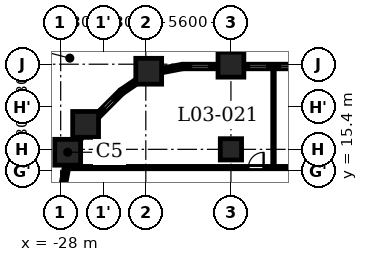
"""IFC4 building model, lengths in metres.
Left out: names, types, materials, properties, quantities, classifications, styles, units other than length and angle.
Written with IfcOpenShell. Run it as: python <this file> out.ifc"""

import sys

from ifc_helpers import new_model, si_unit, direction, frame, frame_2d, origin, origin_2d, place, context, subcontext, project, spatial, rectangle, extrude, element, fill, save


model = new_model("IFC4")
c1 = context("Model", 3, precision=1e-05, world=origin(), true_north=direction((0.0, 1.0)))
c2 = subcontext(c1, "Body", "Model", "MODEL_VIEW")
j1 = project(units=[si_unit("LENGTHUNIT", "METRE"), si_unit("PLANEANGLEUNIT", "RADIAN")], contexts=[c1])
p1 = place(None, origin())
s1 = spatial("IfcSite", under=j1, at=p1, CompositionType="ELEMENT")
p2 = place(p1, origin())
s2 = spatial("IfcBuilding", under=s1, at=p2, CompositionType="ELEMENT")
p3 = place(p2, frame((0.0, 0.0, 16.1)))
s3 = spatial("IfcBuildingStorey", under=s2, at=p3, CompositionType="ELEMENT", Elevation=16.1)
for number, where, z_axis, x_axis in (
    (1, (-16.8, 22.4, 0.0), (0.0, 0.0, 1.0), (1.0, 0.0, 0.0)),
    (2, (-22.209, 21.938, 0.0), (0.0, 0.0, 1.0), (1.0, 0.0, 0.0)),
    (3, (-26.36, 18.44, 0.0), (0.0, 0.0, 1.0), (1.0, 0.0, 0.0)),
    (4, (-27.538, 16.609, 0.0), (0.0, 0.0, 1.0), (1.0, 0.0, 0.0)),
):
    element("IfcColumn", number, at=place(p3, frame(where, z_axis=z_axis, x_axis=x_axis)), inside=s3, PredefinedType="COLUMN", context=c2, shape_type="SweptSolid", body=[
        extrude(rectangle(XDim=1.7, YDim=1.7, at=origin_2d()), origin(), (0.0, 0.0, 1.0), 4.8),
    ])
p4 = place(p3, frame((-16.8, 16.8, 0.0), z_axis=(0.0, 0.0, 1.0), x_axis=(1.0, 0.0, 0.0)))
e5 = element("IfcColumn", 5, at=p4, inside=s3, PredefinedType="COLUMN", context=c2, shape_type="SweptSolid", body=[
    extrude(rectangle(XDim=1.4, YDim=1.4, at=origin_2d()), origin(), (0.0, 0.0, 1.0), 4.8),
])
p5 = place(p3, frame((-12.05, 22.25, 0.0), z_axis=(0.0, 0.0, 1.0), x_axis=(-1.0, 0.0, 0.0)))
e6 = element("IfcWall", 6, at=p5, inside=s3, PredefinedType="SOLIDWALL", context=c2, shape_type="SweptSolid", body=[
    extrude(rectangle(XDim=3.9, YDim=0.3, at=frame_2d((1.95, 0.0))), origin(), (0.0, 0.0, 1.0), 3.55),
])
p6 = place(p5, frame((0.337, 0.0, 0.6)))
e7 = element("IfcOpeningElement", 7, at=p6, cuts=e6, PredefinedType="OPENING", context=c2, shape_type="SweptSolid", body=[
    extrude(rectangle(XDim=1.2, YDim=1.55, at=frame_2d((0.6, 0.775))), frame((0.0, 0.16, 0.0), z_axis=(0.0, -1.0, 0.0), x_axis=(1.0, 0.0, 0.0)), (0.0, 0.0, 1.0), 0.32),
])
p7 = place(p5, frame((2.363, 0.0, 0.6)))
e8 = element("IfcOpeningElement", 8, at=p7, cuts=e6, PredefinedType="OPENING", context=c2, shape_type="SweptSolid", body=[
    extrude(rectangle(XDim=1.2, YDim=1.55, at=frame_2d((0.6, 0.775))), frame((0.0, 0.16, 0.0), z_axis=(0.0, -1.0, 0.0), x_axis=(1.0, 0.0, 0.0)), (0.0, 0.0, 1.0), 0.32),
])
p8 = place(p3, frame((-17.65, 22.25, 0.0), z_axis=(0.0, 0.0, 1.0), x_axis=(-1.0, 0.0, 0.0)))
e9 = element("IfcWall", 9, at=p8, inside=s3, PredefinedType="SOLIDWALL", context=c2, shape_type="SweptSolid", body=[
    extrude(rectangle(XDim=2.35, YDim=0.3, at=frame_2d((1.175, 0.0))), origin(), (0.0, 0.0, 1.0), 3.55),
])
p9 = place(p8, frame((0.575, 0.0, 0.6)))
e10 = element("IfcOpeningElement", 10, at=p9, cuts=e9, PredefinedType="OPENING", context=c2, shape_type="SweptSolid", body=[
    extrude(rectangle(XDim=1.2, YDim=1.55, at=frame_2d((0.6, 0.775))), frame((0.0, 0.16, 0.0), z_axis=(0.0, -1.0, 0.0), x_axis=(1.0, 0.0, 0.0)), (0.0, 0.0, 1.0), 0.32),
])
for number, where, z_axis, x_axis in (
    (11, (-19.972, 22.253, 0.0), (0.0, 0.0, 1.0), (-0.982, -0.187, 0.0)),
    (12, (-22.85, 21.369, 0.0), (0.0, 0.0, 1.0), (-0.827, -0.562, 0.0)),
):
    element("IfcWall", number, at=place(p3, frame(where, z_axis=z_axis, x_axis=x_axis)), inside=s3, PredefinedType="SOLIDWALL", context=c2, shape_type="SweptSolid", body=[
        extrude(rectangle(XDim=1.406, YDim=0.3, at=frame_2d((0.703, 0.0))), origin(), (0.0, 0.0, 1.0), 3.55),
    ])
p10 = place(p3, frame((-23.991, 20.597, 0.0), z_axis=(0.0, 0.0, 1.0), x_axis=(-0.707054835785, -0.707158722772, 0.0)))
e13 = element("IfcWall", 13, at=p10, inside=s3, PredefinedType="SOLIDWALL", context=c2, shape_type="SweptSolid", body=[
    extrude(rectangle(XDim=2.35, YDim=0.3, at=frame_2d((1.175, 0.0))), origin(), (0.0, 0.0, 1.0), 3.55),
])
p11 = place(p10, frame((0.775, 0.0, 0.6)))
e14 = element("IfcOpeningElement", 14, at=p11, cuts=e13, PredefinedType="OPENING", context=c2, shape_type="SweptSolid", body=[
    extrude(rectangle(XDim=0.8, YDim=1.55, at=frame_2d((0.4, 0.775))), frame((0.0, 0.16, 0.0), z_axis=(0.0, -1.0, 0.0), x_axis=(1.0, 0.0, 0.0)), (0.0, 0.0, 1.0), 0.32),
])
p12 = place(p3, frame((-26.701, 17.644, 0.0), z_axis=(0.0, 0.0, 1.0), x_axis=(-0.562001981492, -0.827135885329, 0.0)))
e15 = element("IfcWall", 15, at=p12, inside=s3, PredefinedType="SOLIDWALL", context=c2, shape_type="SweptSolid", body=[
    extrude(rectangle(XDim=0.477, YDim=0.3, at=frame_2d((0.239, 0.0))), origin(), (0.0, 0.0, 1.0), 4.45),
])
p13 = place(p3, frame((-27.589, 15.753, 0.0), z_axis=(0.0, 0.0, 1.0), x_axis=(-0.187327504018, -0.982297514116, 0.0)))
e16 = element("IfcWall", 16, at=p13, inside=s3, PredefinedType="SOLIDWALL", context=c2, shape_type="SweptSolid", body=[
    extrude(rectangle(XDim=1.406, YDim=0.3, at=frame_2d((0.703, 0.0))), origin(), (0.0, 0.0, 1.0), 3.55),
])
p14 = place(p3, frame((-27.446, 15.6, 0.0), z_axis=(0.0, 0.0, 1.0), x_axis=(1.0, 0.0, 0.0)))
e17 = element("IfcWall", 17, at=p14, inside=s3, PredefinedType="PARTITIONING", context=c2, shape_type="SweptSolid", body=[
    extrude(rectangle(XDim=54.892, YDim=0.15, at=frame_2d((27.446, 0.0))), origin(), (0.0, 0.0, 1.0), 4.45),
])
p15 = place(p14, frame((11.796, 0.0, 0.0)))
e18 = element("IfcOpeningElement", 18, at=p15, cuts=e17, PredefinedType="OPENING", context=c2, shape_type="SweptSolid", body=[
    extrude(rectangle(XDim=1.0, YDim=2.1, at=frame_2d((0.5, 1.05))), frame((0.0, 0.085, 0.0), z_axis=(0.0, -1.0, 0.0), x_axis=(1.0, 0.0, 0.0)), (0.0, 0.0, 1.0), 0.17),
])
p16 = place(p14, frame((17.296, 0.0, 0.0)))
e19 = element("IfcOpeningElement", 19, at=p16, cuts=e17, PredefinedType="OPENING", context=c2, shape_type="SweptSolid", body=[
    extrude(rectangle(XDim=1.0, YDim=2.1, at=frame_2d((0.5, 1.05))), frame((0.0, 0.085, 0.0), z_axis=(0.0, -1.0, 0.0), x_axis=(1.0, 0.0, 0.0)), (0.0, 0.0, 1.0), 0.17),
])
p17 = place(p14, frame((29.796, 0.0, 0.0)))
e20 = element("IfcOpeningElement", 20, at=p17, cuts=e17, PredefinedType="OPENING", context=c2, shape_type="SweptSolid", body=[
    extrude(rectangle(XDim=1.0, YDim=2.1, at=frame_2d((0.5, 1.05))), frame((0.0, 0.085, 0.0), z_axis=(0.0, -1.0, 0.0), x_axis=(1.0, 0.0, 0.0)), (0.0, 0.0, 1.0), 0.17),
])
p18 = place(p14, frame((33.896, 0.0, 0.0)))
e21 = element("IfcOpeningElement", 21, at=p18, cuts=e17, PredefinedType="OPENING", context=c2, shape_type="SweptSolid", body=[
    extrude(rectangle(XDim=0.9, YDim=2.1, at=frame_2d((0.45, 1.05))), frame((0.0, 0.085, 0.0), z_axis=(0.0, -1.0, 0.0), x_axis=(1.0, 0.0, 0.0)), (0.0, 0.0, 1.0), 0.17),
])
p19 = place(p14, frame((52.975, 0.0, 0.0)))
e22 = element("IfcOpeningElement", 22, at=p19, cuts=e17, PredefinedType="OPENING", context=c2, shape_type="SweptSolid", body=[
    extrude(rectangle(XDim=1.0, YDim=2.1, at=frame_2d((0.5, 1.05))), frame((0.0, 0.085, 0.0), z_axis=(0.0, -1.0, 0.0), x_axis=(1.0, 0.0, 0.0)), (0.0, 0.0, 1.0), 0.17),
])
p20 = place(p3, frame((-14.0, 15.675, 0.0), z_axis=(0.0, 0.0, 1.0), x_axis=(0.0, 1.0, 0.0)))
e23 = element("IfcWall", 23, at=p20, inside=s3, PredefinedType="PARTITIONING", context=c2, shape_type="SweptSolid", body=[
    extrude(rectangle(XDim=6.405, YDim=0.1, at=frame_2d((3.203, 0.0))), origin(), (0.0, 0.0, 1.0), 4.45),
])
p21 = place(p15, origin())
e24 = element("IfcDoor", 24, at=p21, inside=s3, OperationType="SINGLE_SWING_LEFT", PredefinedType="DOOR", context=c2, shape_type="SweptSolid", body=[
    extrude(rectangle(XDim=1.0, YDim=2.1, at=frame_2d((0.5, 1.05))), frame((0.0, 0.025, 0.0), z_axis=(0.0, -1.0, 0.0), x_axis=(1.0, 0.0, 0.0)), (0.0, 0.0, 1.0), 0.05),
])
fill(e18, e24)
p22 = place(p6, origin())
e25 = element("IfcWindow", 25, at=p22, inside=s3, PartitioningType="SINGLE_PANEL", PredefinedType="WINDOW", context=c2, shape_type="SweptSolid", body=[
    extrude(rectangle(XDim=1.2, YDim=1.55, at=frame_2d((0.6, 0.775))), frame((0.0, 0.03, 0.0), z_axis=(0.0, -1.0, 0.0), x_axis=(1.0, 0.0, 0.0)), (0.0, 0.0, 1.0), 0.06),
])
fill(e7, e25)
p23 = place(p7, origin())
e26 = element("IfcWindow", 26, at=p23, inside=s3, PartitioningType="SINGLE_PANEL", PredefinedType="WINDOW", context=c2, shape_type="SweptSolid", body=[
    extrude(rectangle(XDim=1.2, YDim=1.55, at=frame_2d((0.6, 0.775))), frame((0.0, 0.03, 0.0), z_axis=(0.0, -1.0, 0.0), x_axis=(1.0, 0.0, 0.0)), (0.0, 0.0, 1.0), 0.06),
])
fill(e8, e26)
p24 = place(p9, origin())
e27 = element("IfcWindow", 27, at=p24, inside=s3, PartitioningType="SINGLE_PANEL", PredefinedType="WINDOW", context=c2, shape_type="SweptSolid", body=[
    extrude(rectangle(XDim=1.2, YDim=1.55, at=frame_2d((0.6, 0.775))), frame((0.0, 0.03, 0.0), z_axis=(0.0, -1.0, 0.0), x_axis=(1.0, 0.0, 0.0)), (0.0, 0.0, 1.0), 0.06),
])
fill(e10, e27)
p25 = place(p11, origin())
e28 = element("IfcWindow", 28, at=p25, inside=s3, PartitioningType="SINGLE_PANEL", PredefinedType="WINDOW", context=c2, shape_type="SweptSolid", body=[
    extrude(rectangle(XDim=0.8, YDim=1.55, at=frame_2d((0.4, 0.775))), frame((0.0, 0.03, 0.0), z_axis=(0.0, -1.0, 0.0), x_axis=(1.0, 0.0, 0.0)), (0.0, 0.0, 1.0), 0.06),
])
fill(e14, e28)
save(model, sys.argv[1])
